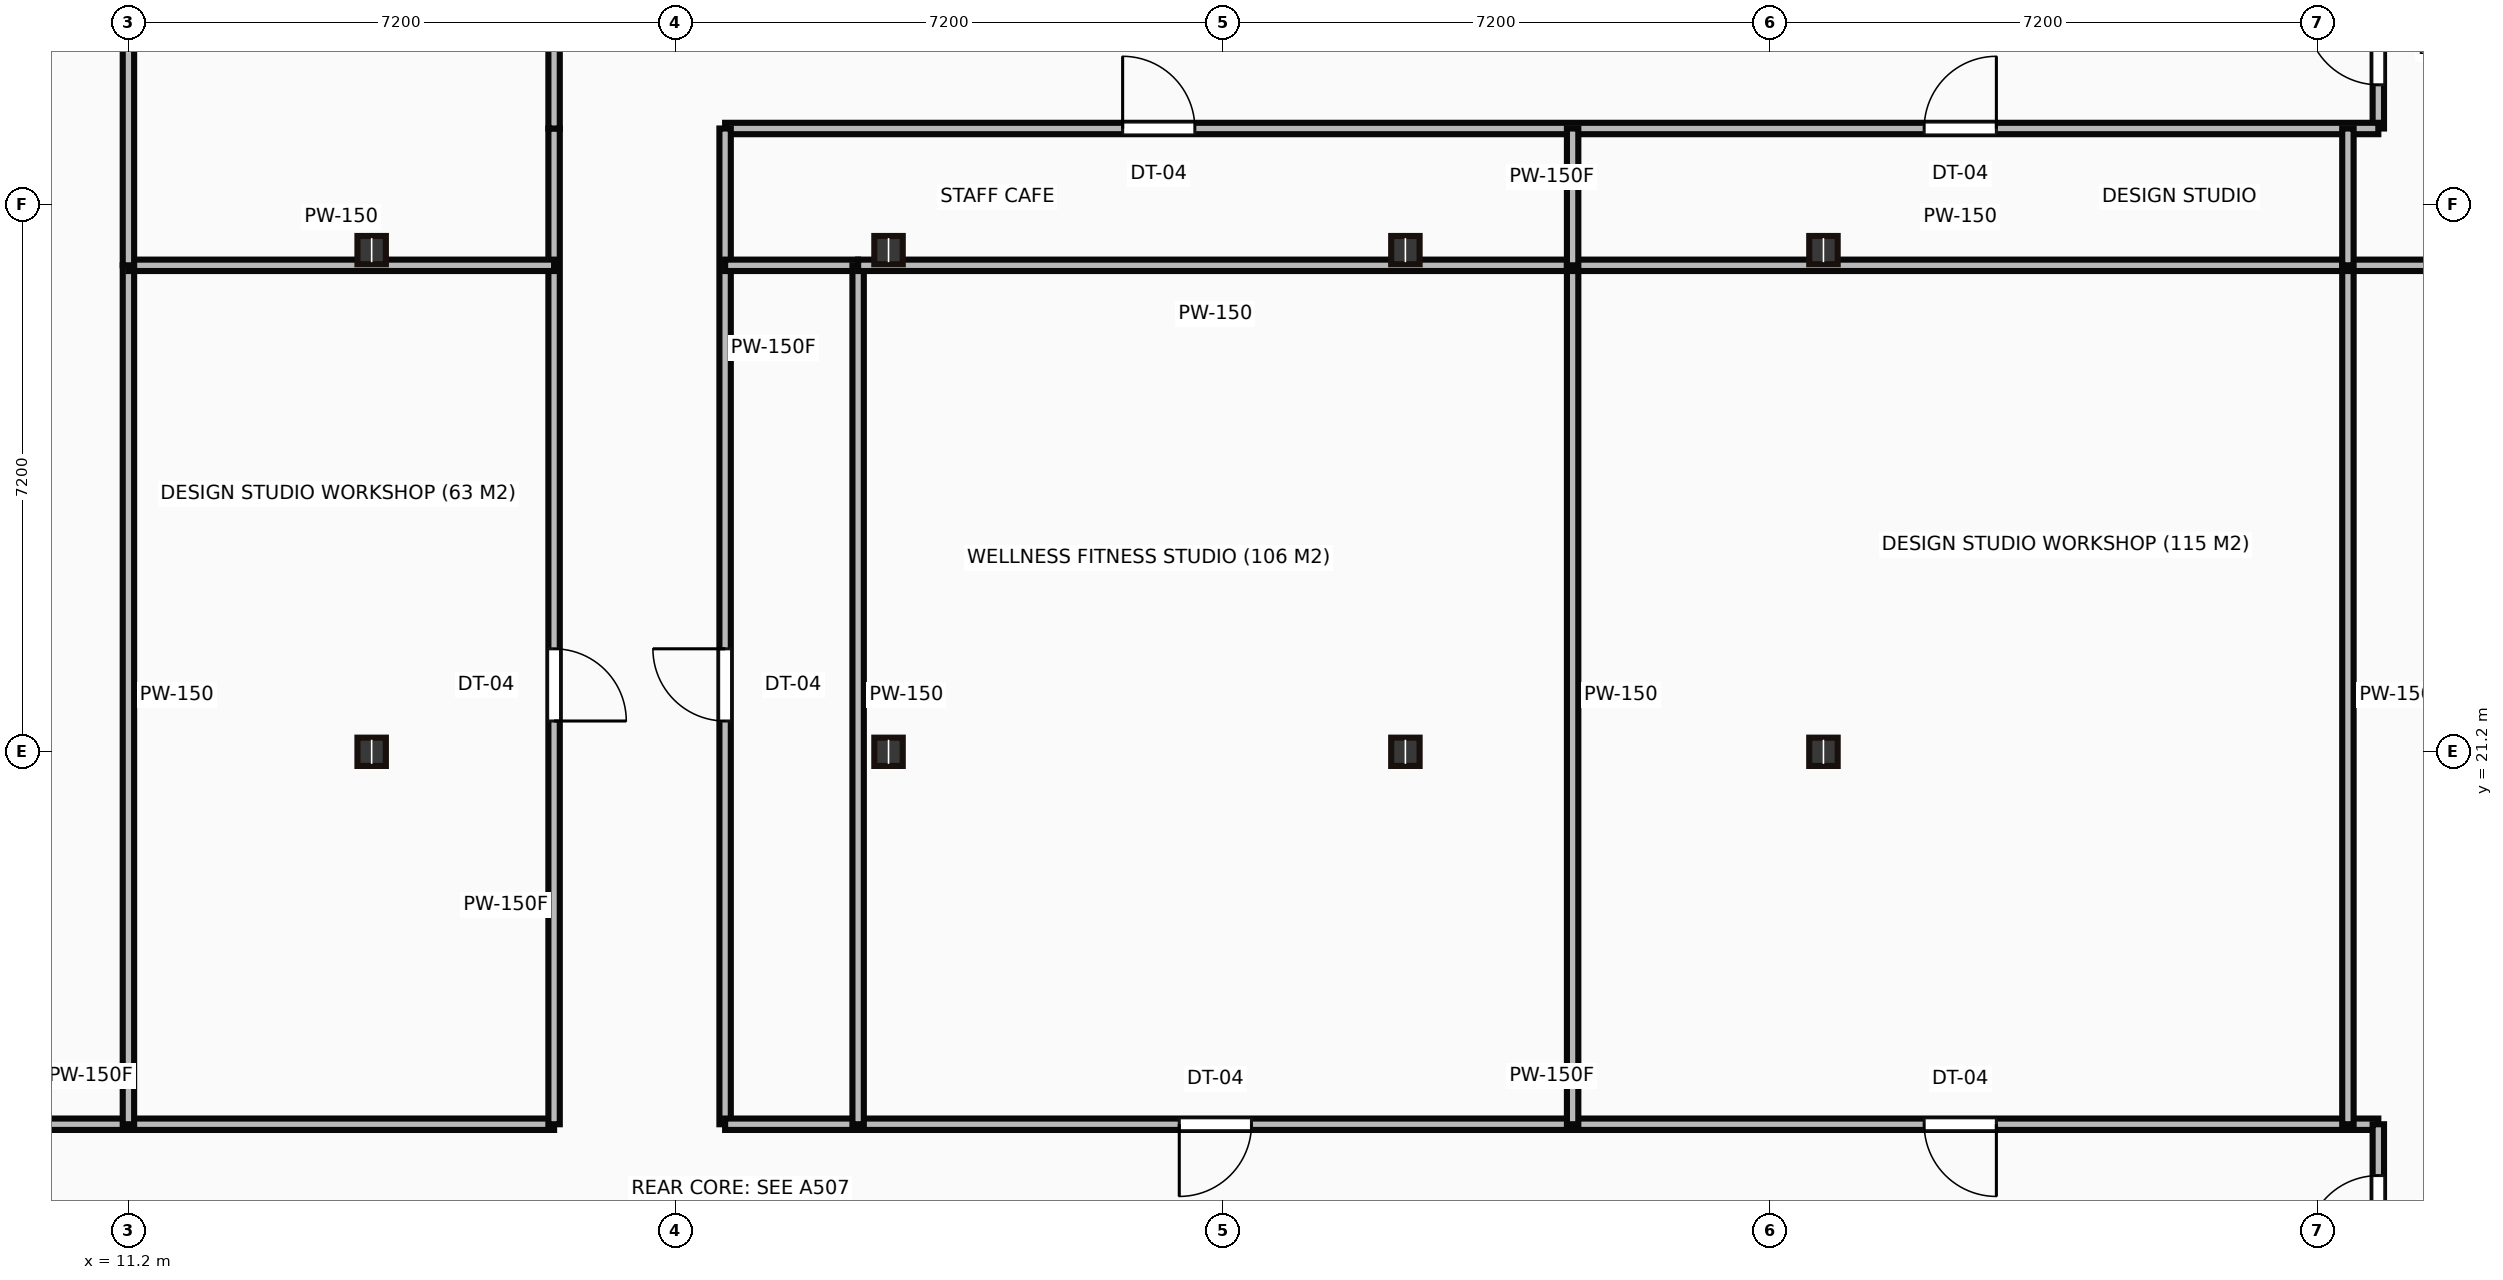
"""IFC4 building model, lengths in metres.
Left out: names, types, materials, properties, quantities, classifications, styles, units other than length and angle.
Written with IfcOpenShell. Run it as: python <this file> out.ifc"""

import sys

from ifc_helpers import new_model, si_unit, direction, frame, frame_2d, origin, origin_2d, place, context, subcontext, project, spatial, rectangle, i_section, extrude, source, transform, mapped, element, fill, save


model = new_model("IFC4")
c1 = context("Model", 3, precision=1e-05, world=origin(), true_north=direction((0.0, 1.0)))
c2 = subcontext(c1, "Body", "Model", "MODEL_VIEW")
j1 = project(units=[si_unit("LENGTHUNIT", "METRE"), si_unit("PLANEANGLEUNIT", "RADIAN")], contexts=[c1])
p1 = place(None, origin())
s1 = spatial("IfcSite", under=j1, at=p1, CompositionType="ELEMENT")
p2 = place(p1, origin())
s2 = spatial("IfcBuilding", under=s1, at=p2, CompositionType="ELEMENT")
p3 = place(p2, frame((0.0, 0.0, 158.85)))
s3 = spatial("IfcBuildingStorey", under=s2, at=p3, CompositionType="ELEMENT", Elevation=158.85)
m1 = source(origin(), c2, "Body", "SweptSolid", [
    extrude(i_section(OverallWidth=0.374, OverallDepth=0.372, WebThickness=0.016, FlangeThickness=0.026, at=origin_2d()), origin(), (0.0, 0.0, 1.0), 3.65),
])
for number, where, z_axis, x_axis in (
    (1, (14.4, 21.2, 0.0), (0.0, 0.0, 1.0), (1.0, 0.0, 0.0)),
    (2, (14.4, 27.8, 0.0), (0.0, 0.0, 1.0), (1.0, 0.0, 0.0)),
    (3, (21.2, 21.2, 0.0), (0.0, 0.0, 1.0), (1.0, 0.0, 0.0)),
    (4, (21.2, 27.8, 0.0), (0.0, 0.0, 1.0), (1.0, 0.0, 0.0)),
    (5, (28.0, 21.2, 0.0), (0.0, 0.0, 1.0), (1.0, 0.0, 0.0)),
    (6, (28.0, 27.8, 0.0), (0.0, 0.0, 1.0), (1.0, 0.0, 0.0)),
    (7, (33.5, 21.2, 0.0), (0.0, 0.0, 1.0), (1.0, 0.0, 0.0)),
    (8, (33.5, 27.8, 0.0), (0.0, 0.0, 1.0), (1.0, 0.0, 0.0)),
):
    element("IfcColumn", number, at=place(p3, frame(where, z_axis=z_axis, x_axis=x_axis)), inside=s3, PredefinedType="COLUMN", context=c2, shape_type="MappedRepresentation", body=[
        mapped(m1, transform((0.0, 0.0, 0.0))),
    ])
m2 = source(origin(), c2, "Body", "SweptSolid", [
    extrude(rectangle(XDim=12.2, YDim=0.15, at=frame_2d((6.1, 0.0))), origin(), (0.0, 0.0, 1.0), 3.4),
])
p4 = place(p3, frame((4.6, 16.3, 0.0), z_axis=(0.0, 0.0, 1.0), x_axis=(1.0, 0.0, 0.0)))
e9 = element("IfcWall", 9, at=p4, inside=s3, PredefinedType="PARTITIONING", context=c2, shape_type="MappedRepresentation", body=[
    mapped(m2, transform((0.0, 0.0, 0.0))),
])
p5 = place(p4, frame((2.955, 0.0, 0.0)))
e10 = element("IfcOpeningElement", 10, at=p5, cuts=e9, PredefinedType="OPENING", context=c2, shape_type="SweptSolid", body=[
    extrude(rectangle(XDim=0.95, YDim=2.15, at=frame_2d((0.475, 1.075))), frame((0.0, 0.085, 0.0), z_axis=(0.0, -1.0, 0.0), x_axis=(1.0, 0.0, 0.0)), (0.0, 0.0, 1.0), 0.17),
])
m3 = source(origin(), c2, "Body", "SweptSolid", [
    extrude(rectangle(XDim=13.1, YDim=0.15, at=frame_2d((6.55, 0.0))), origin(), (0.0, 0.0, 1.0), 3.4),
])
p6 = place(p3, frame((16.8, 16.3, 0.0), z_axis=(0.0, 0.0, 1.0), x_axis=(0.0, 1.0, 0.0)))
e11 = element("IfcWall", 11, at=p6, inside=s3, PredefinedType="PARTITIONING", context=c2, shape_type="MappedRepresentation", body=[
    mapped(m3, transform((0.0, 0.0, 0.0))),
])
p7 = place(p6, frame((5.305, 0.0, 0.0)))
e12 = element("IfcOpeningElement", 12, at=p7, cuts=e11, PredefinedType="OPENING", context=c2, shape_type="SweptSolid", body=[
    extrude(rectangle(XDim=0.95, YDim=2.15, at=frame_2d((0.475, 1.075))), frame((0.0, 0.085, 0.0), z_axis=(0.0, -1.0, 0.0), x_axis=(1.0, 0.0, 0.0)), (0.0, 0.0, 1.0), 0.17),
])
m4 = source(origin(), c2, "Body", "SweptSolid", [
    extrude(rectangle(XDim=2.1, YDim=0.15, at=frame_2d((1.05, 0.0))), origin(), (0.0, 0.0, 1.0), 3.4),
])
p8 = place(p3, frame((16.8, 29.4, 0.0), z_axis=(0.0, 0.0, 1.0), x_axis=(0.0, 1.0, 0.0)))
e13 = element("IfcWall", 13, at=p8, inside=s3, PredefinedType="PARTITIONING", context=c2, shape_type="MappedRepresentation", body=[
    mapped(m4, transform((0.0, 0.0, 0.0))),
])
p9 = place(p3, frame((40.8, 31.5, 0.0), z_axis=(0.0, 0.0, 1.0), x_axis=(0.0, -1.0, 0.0)))
e14 = element("IfcWall", 14, at=p9, inside=s3, PredefinedType="PARTITIONING", context=c2, shape_type="MappedRepresentation", body=[
    mapped(m4, transform((0.0, 0.0, 0.0))),
])
p10 = place(p9, frame((0.575, 0.0, 0.0)))
e15 = element("IfcOpeningElement", 15, at=p10, cuts=e14, PredefinedType="OPENING", context=c2, shape_type="SweptSolid", body=[
    extrude(rectangle(XDim=0.95, YDim=2.15, at=frame_2d((0.475, 1.075))), frame((0.0, 0.085, 0.0), z_axis=(0.0, -1.0, 0.0), x_axis=(1.0, 0.0, 0.0)), (0.0, 0.0, 1.0), 0.17),
])
m5 = source(origin(), c2, "Body", "SweptSolid", [
    extrude(rectangle(XDim=21.75, YDim=0.15, at=frame_2d((10.875, 0.0))), origin(), (0.0, 0.0, 1.0), 3.4),
])
p11 = place(p3, frame((40.8, 29.4, 0.0), z_axis=(0.0, 0.0, 1.0), x_axis=(-1.0, 0.0, 0.0)))
e16 = element("IfcWall", 16, at=p11, inside=s3, PredefinedType="PARTITIONING", context=c2, shape_type="MappedRepresentation", body=[
    mapped(m5, transform((0.0, 0.0, 0.0))),
])
p12 = place(p11, frame((15.57, 0.0, 0.0)))
e17 = element("IfcOpeningElement", 17, at=p12, cuts=e16, PredefinedType="OPENING", context=c2, shape_type="SweptSolid", body=[
    extrude(rectangle(XDim=0.95, YDim=2.15, at=frame_2d((0.475, 1.075))), frame((0.0, 0.085, 0.0), z_axis=(0.0, -1.0, 0.0), x_axis=(1.0, 0.0, 0.0)), (0.0, 0.0, 1.0), 0.17),
])
p13 = place(p11, frame((5.025, 0.0, 0.0)))
e18 = element("IfcOpeningElement", 18, at=p13, cuts=e16, PredefinedType="OPENING", context=c2, shape_type="SweptSolid", body=[
    extrude(rectangle(XDim=0.95, YDim=2.15, at=frame_2d((0.475, 1.075))), frame((0.0, 0.085, 0.0), z_axis=(0.0, -1.0, 0.0), x_axis=(1.0, 0.0, 0.0)), (0.0, 0.0, 1.0), 0.17),
])
p14 = place(p3, frame((19.05, 29.4, 0.0), z_axis=(0.0, 0.0, 1.0), x_axis=(0.0, -1.0, 0.0)))
e19 = element("IfcWall", 19, at=p14, inside=s3, PredefinedType="PARTITIONING", context=c2, shape_type="MappedRepresentation", body=[
    mapped(m3, transform((0.0, 0.0, 0.0))),
])
p15 = place(p14, frame((6.845, 0.0, 0.0)))
e20 = element("IfcOpeningElement", 20, at=p15, cuts=e19, PredefinedType="OPENING", context=c2, shape_type="SweptSolid", body=[
    extrude(rectangle(XDim=0.95, YDim=2.15, at=frame_2d((0.475, 1.075))), frame((0.0, 0.085, 0.0), z_axis=(0.0, -1.0, 0.0), x_axis=(1.0, 0.0, 0.0)), (0.0, 0.0, 1.0), 0.17),
])
p16 = place(p3, frame((19.05, 16.3, 0.0), z_axis=(0.0, 0.0, 1.0), x_axis=(1.0, 0.0, 0.0)))
e21 = element("IfcWall", 21, at=p16, inside=s3, PredefinedType="PARTITIONING", context=c2, shape_type="MappedRepresentation", body=[
    mapped(m5, transform((0.0, 0.0, 0.0))),
])
p17 = place(p16, frame((5.975, 0.0, 0.0)))
e22 = element("IfcOpeningElement", 22, at=p17, cuts=e21, PredefinedType="OPENING", context=c2, shape_type="SweptSolid", body=[
    extrude(rectangle(XDim=0.95, YDim=2.15, at=frame_2d((0.475, 1.075))), frame((0.0, 0.085, 0.0), z_axis=(0.0, -1.0, 0.0), x_axis=(1.0, 0.0, 0.0)), (0.0, 0.0, 1.0), 0.17),
])
p18 = place(p16, frame((15.775, 0.0, 0.0)))
e23 = element("IfcOpeningElement", 23, at=p18, cuts=e21, PredefinedType="OPENING", context=c2, shape_type="SweptSolid", body=[
    extrude(rectangle(XDim=0.95, YDim=2.15, at=frame_2d((0.475, 1.075))), frame((0.0, 0.085, 0.0), z_axis=(0.0, -1.0, 0.0), x_axis=(1.0, 0.0, 0.0)), (0.0, 0.0, 1.0), 0.17),
])
m6 = source(origin(), c2, "Body", "SweptSolid", [
    extrude(rectangle(XDim=2.3, YDim=0.15, at=frame_2d((1.15, 0.0))), origin(), (0.0, 0.0, 1.0), 3.4),
])
p19 = place(p3, frame((40.8, 16.3, 0.0), z_axis=(0.0, 0.0, 1.0), x_axis=(0.0, -1.0, 0.0)))
e24 = element("IfcWall", 24, at=p19, inside=s3, PredefinedType="PARTITIONING", context=c2, shape_type="MappedRepresentation", body=[
    mapped(m6, transform((0.0, 0.0, 0.0))),
])
p20 = place(p19, frame((0.675, 0.0, 0.0)))
e25 = element("IfcOpeningElement", 25, at=p20, cuts=e24, PredefinedType="OPENING", context=c2, shape_type="SweptSolid", body=[
    extrude(rectangle(XDim=0.95, YDim=2.15, at=frame_2d((0.475, 1.075))), frame((0.0, 0.085, 0.0), z_axis=(0.0, -1.0, 0.0), x_axis=(1.0, 0.0, 0.0)), (0.0, 0.0, 1.0), 0.17),
])
m7 = source(origin(), c2, "Body", "SweptSolid", [
    extrude(rectangle(XDim=11.3, YDim=0.15, at=frame_2d((5.65, 0.0))), origin(), (0.0, 0.0, 1.0), 3.4),
])
p21 = place(p3, frame((11.2, 27.6, 0.0), z_axis=(0.0, 0.0, 1.0), x_axis=(0.0, -1.0, 0.0)))
e26 = element("IfcWall", 26, at=p21, inside=s3, PredefinedType="PARTITIONING", context=c2, shape_type="MappedRepresentation", body=[
    mapped(m7, transform((0.0, 0.0, 0.0))),
])
m8 = source(origin(), c2, "Body", "SweptSolid", [
    extrude(rectangle(XDim=5.6, YDim=0.15, at=frame_2d((2.8, 0.0))), origin(), (0.0, 0.0, 1.0), 3.4),
])
p22 = place(p3, frame((11.2, 27.6, 0.0), z_axis=(0.0, 0.0, 1.0), x_axis=(1.0, 0.0, 0.0)))
e27 = element("IfcWall", 27, at=p22, inside=s3, PredefinedType="PARTITIONING", context=c2, shape_type="MappedRepresentation", body=[
    mapped(m8, transform((0.0, 0.0, 0.0))),
])
m9 = source(origin(), c2, "Body", "SweptSolid", [
    extrude(rectangle(XDim=11.206, YDim=0.15, at=frame_2d((5.603, 0.0))), origin(), (0.0, 0.0, 1.0), 3.4),
])
p23 = place(p3, frame((11.2, 38.806, 0.0), z_axis=(0.0, 0.0, 1.0), x_axis=(0.0, -1.0, 0.0)))
e28 = element("IfcWall", 28, at=p23, inside=s3, PredefinedType="PARTITIONING", context=c2, shape_type="MappedRepresentation", body=[
    mapped(m9, transform((0.0, 0.0, 0.0))),
])
m10 = source(origin(), c2, "Body", "SweptSolid", [
    extrude(rectangle(XDim=1.75, YDim=0.15, at=frame_2d((0.875, 0.0))), origin(), (0.0, 0.0, 1.0), 3.4),
])
p24 = place(p3, frame((19.05, 27.6, 0.0), z_axis=(0.0, 0.0, 1.0), x_axis=(1.0, 0.0, 0.0)))
e29 = element("IfcWall", 29, at=p24, inside=s3, PredefinedType="PARTITIONING", context=c2, shape_type="MappedRepresentation", body=[
    mapped(m10, transform((0.0, 0.0, 0.0))),
])
p25 = place(p3, frame((20.8, 27.6, 0.0), z_axis=(0.0, 0.0, 1.0), x_axis=(0.0, -1.0, 0.0)))
e30 = element("IfcWall", 30, at=p25, inside=s3, PredefinedType="PARTITIONING", context=c2, shape_type="MappedRepresentation", body=[
    mapped(m7, transform((0.0, 0.0, 0.0))),
])
m11 = source(origin(), c2, "Body", "SweptSolid", [
    extrude(rectangle(XDim=9.4, YDim=0.15, at=frame_2d((4.7, 0.0))), origin(), (0.0, 0.0, 1.0), 3.4),
])
p26 = place(p3, frame((30.2, 27.6, 0.0), z_axis=(0.0, 0.0, 1.0), x_axis=(-1.0, 0.0, 0.0)))
e31 = element("IfcWall", 31, at=p26, inside=s3, PredefinedType="PARTITIONING", context=c2, shape_type="MappedRepresentation", body=[
    mapped(m11, transform((0.0, 0.0, 0.0))),
])
p27 = place(p3, frame((30.2, 27.6, 0.0), z_axis=(0.0, 0.0, 1.0), x_axis=(0.0, -1.0, 0.0)))
e32 = element("IfcWall", 32, at=p27, inside=s3, PredefinedType="PARTITIONING", context=c2, shape_type="MappedRepresentation", body=[
    mapped(m7, transform((0.0, 0.0, 0.0))),
])
m12 = source(origin(), c2, "Body", "SweptSolid", [
    extrude(rectangle(XDim=10.2, YDim=0.15, at=frame_2d((5.1, 0.0))), origin(), (0.0, 0.0, 1.0), 3.4),
])
p28 = place(p3, frame((30.2, 27.6, 0.0), z_axis=(0.0, 0.0, 1.0), x_axis=(1.0, 0.0, 0.0)))
e33 = element("IfcWall", 33, at=p28, inside=s3, PredefinedType="PARTITIONING", context=c2, shape_type="MappedRepresentation", body=[
    mapped(m12, transform((0.0, 0.0, 0.0))),
])
m13 = source(origin(), c2, "Body", "SweptSolid", [
    extrude(rectangle(XDim=1.8, YDim=0.15, at=frame_2d((0.9, 0.0))), origin(), (0.0, 0.0, 1.0), 3.4),
])
p29 = place(p3, frame((30.2, 29.4, 0.0), z_axis=(0.0, 0.0, 1.0), x_axis=(0.0, -1.0, 0.0)))
e34 = element("IfcWall", 34, at=p29, inside=s3, PredefinedType="PARTITIONING", context=c2, shape_type="MappedRepresentation", body=[
    mapped(m13, transform((0.0, 0.0, 0.0))),
])
p30 = place(p3, frame((40.4, 27.6, 0.0), z_axis=(0.0, 0.0, 1.0), x_axis=(0.0, -1.0, 0.0)))
e35 = element("IfcWall", 35, at=p30, inside=s3, PredefinedType="PARTITIONING", context=c2, shape_type="MappedRepresentation", body=[
    mapped(m7, transform((0.0, 0.0, 0.0))),
])
m14 = source(origin(), c2, "Body", "SweptSolid", [
    extrude(rectangle(XDim=9.58, YDim=0.15, at=frame_2d((4.79, 0.0))), origin(), (0.0, 0.0, 1.0), 3.4),
])
p31 = place(p3, frame((40.4, 27.6, 0.0), z_axis=(0.0, 0.0, 1.0), x_axis=(1.0, 0.0, 0.0)))
e36 = element("IfcWall", 36, at=p31, inside=s3, PredefinedType="PARTITIONING", context=c2, shape_type="MappedRepresentation", body=[
    mapped(m14, transform((0.0, 0.0, 0.0))),
])
p32 = place(p3, frame((40.4, 29.4, 0.0), z_axis=(0.0, 0.0, 1.0), x_axis=(0.0, -1.0, 0.0)))
e37 = element("IfcWall", 37, at=p32, inside=s3, PredefinedType="PARTITIONING", context=c2, shape_type="MappedRepresentation", body=[
    mapped(m13, transform((0.0, 0.0, 0.0))),
])
m15 = source(origin(), c2, "Body", "SweptSolid", [
    extrude(rectangle(XDim=0.95, YDim=2.15, at=frame_2d((0.475, 1.075))), frame((0.0, 0.025, 0.0), z_axis=(0.0, -1.0, 0.0), x_axis=(1.0, 0.0, 0.0)), (0.0, 0.0, 1.0), 0.05),
])
p33 = place(p7, origin())
e38 = element("IfcDoor", 38, at=p33, inside=s3, OperationType="SINGLE_SWING_LEFT", PredefinedType="DOOR", context=c2, shape_type="MappedRepresentation", body=[
    mapped(m15, transform((0.0, 0.0, 0.0))),
])
fill(e12, e38)
p34 = place(p15, origin())
e39 = element("IfcDoor", 39, at=p34, inside=s3, OperationType="SINGLE_SWING_LEFT", PredefinedType="DOOR", context=c2, shape_type="MappedRepresentation", body=[
    mapped(m15, transform((0.0, 0.0, 0.0))),
])
fill(e20, e39)
p35 = place(p12, origin())
e40 = element("IfcDoor", 40, at=p35, inside=s3, OperationType="SINGLE_SWING_RIGHT", PredefinedType="DOOR", context=c2, shape_type="MappedRepresentation", body=[
    mapped(m15, transform((0.0, 0.0, 0.0))),
])
fill(e17, e40)
p36 = place(p17, origin())
e41 = element("IfcDoor", 41, at=p36, inside=s3, OperationType="SINGLE_SWING_LEFT", PredefinedType="DOOR", context=c2, shape_type="MappedRepresentation", body=[
    mapped(m15, transform((0.0, 0.0, 0.0))),
])
fill(e22, e41)
p37 = place(p18, origin())
e42 = element("IfcDoor", 42, at=p37, inside=s3, OperationType="SINGLE_SWING_RIGHT", PredefinedType="DOOR", context=c2, shape_type="MappedRepresentation", body=[
    mapped(m15, transform((0.0, 0.0, 0.0))),
])
fill(e23, e42)
p38 = place(p13, origin())
e43 = element("IfcDoor", 43, at=p38, inside=s3, OperationType="SINGLE_SWING_LEFT", PredefinedType="DOOR", context=c2, shape_type="MappedRepresentation", body=[
    mapped(m15, transform((0.0, 0.0, 0.0))),
])
fill(e18, e43)
p39 = place(p20, origin())
e44 = element("IfcDoor", 44, at=p39, inside=s3, OperationType="SINGLE_SWING_RIGHT", PredefinedType="DOOR", context=c2, shape_type="MappedRepresentation", body=[
    mapped(m15, transform((0.0, 0.0, 0.0))),
])
fill(e25, e44)
p40 = place(p10, origin())
e45 = element("IfcDoor", 45, at=p40, inside=s3, OperationType="SINGLE_SWING_LEFT", PredefinedType="DOOR", context=c2, shape_type="MappedRepresentation", body=[
    mapped(m15, transform((0.0, 0.0, 0.0))),
])
fill(e15, e45)
save(model, sys.argv[1])
